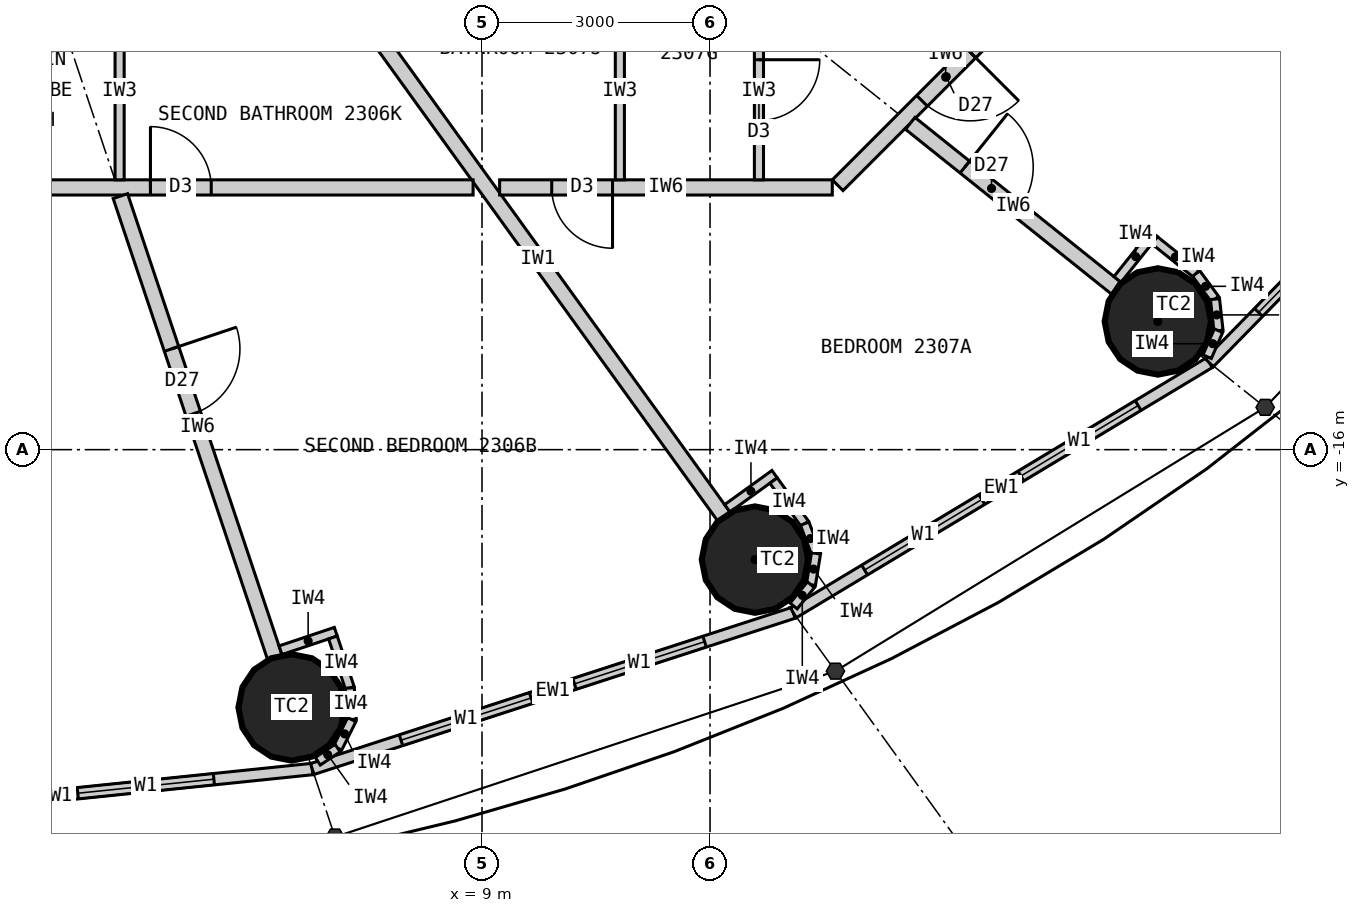
"""IFC4 building model, lengths in metres.
Left out: names, types, materials, properties, quantities, classifications, styles, units other than length and angle.
Written with IfcOpenShell. Run it as: python <this file> out.ifc"""

import sys

from ifc_helpers import new_model, si_unit, direction, frame, frame_2d, origin, origin_2d, place, context, subcontext, project, spatial, rectangle, circle, extrude, clip, halfspace, element, fill, save


model = new_model("IFC4")
c1 = context("Model", 3, precision=1e-05, world=origin(), true_north=direction((0.0, 1.0)))
c2 = subcontext(c1, "Body", "Model", "MODEL_VIEW")
j1 = project(units=[si_unit("LENGTHUNIT", "METRE"), si_unit("PLANEANGLEUNIT", "RADIAN")], contexts=[c1])
p1 = place(None, origin())
s1 = spatial("IfcSite", under=j1, at=p1, CompositionType="ELEMENT")
p2 = place(p1, origin())
s2 = spatial("IfcBuilding", under=s1, at=p2, CompositionType="ELEMENT")
p3 = place(p2, frame((0.0, 0.0, 90.3)))
s3 = spatial("IfcBuildingStorey", under=s2, at=p3, CompositionType="ELEMENT", Elevation=90.3)
for number, where, z_axis, x_axis in (
    (1, (6.495, -19.391, 0.0), (0.0, 0.0, 1.0), (1.0, 0.0, 0.0)),
    (2, (12.591, -17.447, 0.0), (0.0, 0.0, 1.0), (1.0, 0.0, 0.0)),
    (3, (17.892, -14.313, 0.0), (0.0, 0.0, 1.0), (1.0, 0.0, 0.0)),
):
    element("IfcColumn", number, at=place(p3, frame(where, z_axis=z_axis, x_axis=x_axis)), inside=s3, PredefinedType="COLUMN", context=c2, shape_type="Clipping", body=[
        clip(extrude(circle(Radius=0.7, at=origin_2d()), origin(), (0.0, 0.0, 1.0), 3.3), halfspace(frame((0.0, 0.0, 2.25), z_axis=(0.0, 0.0, 1.0), x_axis=(1.0, 0.0, 0.0)), False)),
    ])
p4 = place(p3, frame((0.0, -20.9, 0.0), z_axis=(0.0, 0.0, 1.0), x_axis=(0.994721394369, 0.102612609291, 0.0)))
e4 = element("IfcWall", 4, at=p4, inside=s3, PredefinedType="ELEMENTEDWALL", context=c2, shape_type="SweptSolid", body=[
    extrude(rectangle(XDim=6.802, YDim=0.15, at=frame_2d((3.401, 0.0))), origin(), (0.0, 0.0, 1.0), 3.05),
])
p5 = place(p4, frame((1.301, 0.0, 0.9)))
e5 = element("IfcOpeningElement", 5, at=p5, cuts=e4, PredefinedType="OPENING", context=c2, shape_type="SweptSolid", body=[
    extrude(rectangle(XDim=1.8, YDim=1.9, at=frame_2d((0.9, 0.95))), frame((0.0, 0.085, 0.0), z_axis=(0.0, -1.0, 0.0), x_axis=(1.0, 0.0, 0.0)), (0.0, 0.0, 1.0), 0.17),
])
p6 = place(p4, frame((3.701, 0.0, 0.9)))
e6 = element("IfcOpeningElement", 6, at=p6, cuts=e4, PredefinedType="OPENING", context=c2, shape_type="SweptSolid", body=[
    extrude(rectangle(XDim=1.8, YDim=1.9, at=frame_2d((0.9, 0.95))), frame((0.0, 0.085, 0.0), z_axis=(0.0, -1.0, 0.0), x_axis=(1.0, 0.0, 0.0)), (0.0, 0.0, 1.0), 0.17),
])
p7 = place(p3, frame((6.766, -20.202, 0.0), z_axis=(0.0, 0.0, 1.0), x_axis=(0.951137534625, 0.308767534285, 0.0)))
e7 = element("IfcWall", 7, at=p7, inside=s3, PredefinedType="ELEMENTEDWALL", context=c2, shape_type="SweptSolid", body=[
    extrude(rectangle(XDim=6.655, YDim=0.15, at=frame_2d((3.328, 0.0))), origin(), (0.0, 0.0, 1.0), 3.05),
])
p8 = place(p7, frame((1.228, 0.0, 0.9)))
e8 = element("IfcOpeningElement", 8, at=p8, cuts=e7, PredefinedType="OPENING", context=c2, shape_type="SweptSolid", body=[
    extrude(rectangle(XDim=1.8, YDim=1.9, at=frame_2d((0.9, 0.95))), frame((0.0, 0.085, 0.0), z_axis=(0.0, -1.0, 0.0), x_axis=(1.0, 0.0, 0.0)), (0.0, 0.0, 1.0), 0.17),
])
p9 = place(p7, frame((3.628, 0.0, 0.9)))
e9 = element("IfcOpeningElement", 9, at=p9, cuts=e7, PredefinedType="OPENING", context=c2, shape_type="SweptSolid", body=[
    extrude(rectangle(XDim=1.8, YDim=1.9, at=frame_2d((0.9, 0.95))), frame((0.0, 0.085, 0.0), z_axis=(0.0, -1.0, 0.0), x_axis=(1.0, 0.0, 0.0)), (0.0, 0.0, 1.0), 0.17),
])
p10 = place(p3, frame((13.096, -18.147, 0.0), z_axis=(0.0, 0.0, 1.0), x_axis=(0.856983180864, 0.515344377787, 0.0)))
e10 = element("IfcWall", 10, at=p10, inside=s3, PredefinedType="ELEMENTEDWALL", context=c2, shape_type="SweptSolid", body=[
    extrude(rectangle(XDim=6.386, YDim=0.15, at=frame_2d((3.193, 0.0))), origin(), (0.0, 0.0, 1.0), 3.05),
])
p11 = place(p10, frame((1.093, 0.0, 0.9)))
e11 = element("IfcOpeningElement", 11, at=p11, cuts=e10, PredefinedType="OPENING", context=c2, shape_type="SweptSolid", body=[
    extrude(rectangle(XDim=1.8, YDim=1.9, at=frame_2d((0.9, 0.95))), frame((0.0, 0.085, 0.0), z_axis=(0.0, -1.0, 0.0), x_axis=(1.0, 0.0, 0.0)), (0.0, 0.0, 1.0), 0.17),
])
p12 = place(p10, frame((3.493, 0.0, 0.9)))
e12 = element("IfcOpeningElement", 12, at=p12, cuts=e10, PredefinedType="OPENING", context=c2, shape_type="SweptSolid", body=[
    extrude(rectangle(XDim=1.8, YDim=1.9, at=frame_2d((0.9, 0.95))), frame((0.0, 0.085, 0.0), z_axis=(0.0, -1.0, 0.0), x_axis=(1.0, 0.0, 0.0)), (0.0, 0.0, 1.0), 0.17),
])
p13 = place(p3, frame((18.57, -14.856, 0.0), z_axis=(0.0, 0.0, 1.0), x_axis=(0.699602905915, 0.714531856557, 0.0)))
e13 = element("IfcWall", 13, at=p13, inside=s3, PredefinedType="ELEMENTEDWALL", context=c2, shape_type="SweptSolid", body=[
    extrude(rectangle(XDim=6.051, YDim=0.15, at=frame_2d((3.025, 0.0))), origin(), (0.0, 0.0, 1.0), 3.05),
])
p14 = place(p13, frame((0.926, 0.0, 0.9)))
e14 = element("IfcOpeningElement", 14, at=p14, cuts=e13, PredefinedType="OPENING", context=c2, shape_type="SweptSolid", body=[
    extrude(rectangle(XDim=1.8, YDim=1.9, at=frame_2d((0.9, 0.95))), frame((0.0, 0.085, 0.0), z_axis=(0.0, -1.0, 0.0), x_axis=(1.0, 0.0, 0.0)), (0.0, 0.0, 1.0), 0.17),
])
p15 = place(p13, frame((3.325, 0.0, 0.9)))
e15 = element("IfcOpeningElement", 15, at=p15, cuts=e13, PredefinedType="OPENING", context=c2, shape_type="SweptSolid", body=[
    extrude(rectangle(XDim=1.8, YDim=1.9, at=frame_2d((0.9, 0.95))), frame((0.0, 0.085, 0.0), z_axis=(0.0, -1.0, 0.0), x_axis=(1.0, 0.0, 0.0)), (0.0, 0.0, 1.0), 0.17),
])
p16 = place(p3, frame((7.289, -10.1, 0.0), z_axis=(0.0, 0.0, 1.0), x_axis=(0.585198353053, -0.810890182197, 0.0)))
e16 = element("IfcWall", 16, at=p16, inside=s3, PredefinedType="PARTITIONING", context=c2, shape_type="SweptSolid", body=[
    extrude(rectangle(XDim=8.36, YDim=0.2, at=frame_2d((4.18, 0.0))), origin(), (0.0, 0.0, 1.0), 2.15),
])
p17 = place(p3, frame((-8.883, -12.55, 0.0), z_axis=(0.0, 0.0, 1.0), x_axis=(1.0, 0.0, 0.0)))
e17 = element("IfcWall", 17, at=p17, inside=s3, PredefinedType="PARTITIONING", context=c2, shape_type="SweptSolid", body=[
    extrude(rectangle(XDim=17.765, YDim=0.2, at=frame_2d((8.883, 0.0))), origin(), (0.0, 0.0, 1.0), 3.05),
])
p18 = place(p17, frame((3.42, 0.0, 0.0)))
e18 = element("IfcOpeningElement", 18, at=p18, cuts=e17, PredefinedType="OPENING", context=c2, shape_type="SweptSolid", body=[
    extrude(rectangle(XDim=0.8, YDim=2.1, at=frame_2d((0.4, 1.05))), frame((0.0, 0.11, 0.0), z_axis=(0.0, -1.0, 0.0), x_axis=(1.0, 0.0, 0.0)), (0.0, 0.0, 1.0), 0.22),
])
p19 = place(p17, frame((13.52, 0.0, 0.0)))
e19 = element("IfcOpeningElement", 19, at=p19, cuts=e17, PredefinedType="OPENING", context=c2, shape_type="SweptSolid", body=[
    extrude(rectangle(XDim=0.8, YDim=2.1, at=frame_2d((0.4, 1.05))), frame((0.0, 0.11, 0.0), z_axis=(0.0, -1.0, 0.0), x_axis=(1.0, 0.0, 0.0)), (0.0, 0.0, 1.0), 0.22),
])
p20 = place(p17, frame((8.42, 0.0, 0.0)))
e20 = element("IfcOpeningElement", 20, at=p20, cuts=e17, PredefinedType="OPENING", context=c2, shape_type="SweptSolid", body=[
    extrude(rectangle(XDim=0.9, YDim=2.1, at=frame_2d((0.45, 1.05))), frame((0.0, 0.11, 0.0), z_axis=(0.0, -1.0, 0.0), x_axis=(1.0, 0.0, 0.0)), (0.0, 0.0, 1.0), 0.22),
])
p21 = place(p3, frame((4.242, -12.664, 0.0), z_axis=(0.0, 0.0, 1.0), x_axis=(0.317590505374, -0.94822796357, 0.0)))
e21 = element("IfcWall", 21, at=p21, inside=s3, PredefinedType="PARTITIONING", context=c2, shape_type="SweptSolid", body=[
    extrude(rectangle(XDim=6.394, YDim=0.2, at=frame_2d((3.197, 0.0))), origin(), (0.0, 0.0, 1.0), 2.15),
])
p22 = place(p21, frame((2.12, 0.0, 0.0)))
e22 = element("IfcOpeningElement", 22, at=p22, cuts=e21, PredefinedType="OPENING", context=c2, shape_type="SweptSolid", body=[
    extrude(rectangle(XDim=0.9, YDim=2.1, at=frame_2d((0.45, 1.05))), frame((0.0, 0.11, 0.0), z_axis=(0.0, -1.0, 0.0), x_axis=(1.0, 0.0, 0.0)), (0.0, 0.0, 1.0), 0.22),
])
p23 = place(p3, frame((4.232, -10.1, 0.0), z_axis=(0.0, 0.0, 1.0), x_axis=(0.0, -1.0, 0.0)))
e23 = element("IfcWall", 23, at=p23, inside=s3, PredefinedType="PARTITIONING", context=c2, shape_type="SweptSolid", body=[
    extrude(rectangle(XDim=2.35, YDim=0.12, at=frame_2d((1.175, 0.0))), origin(), (0.0, 0.0, 1.0), 3.05),
])
p24 = place(p3, frame((9.232, -12.55, 0.0), z_axis=(0.0, 0.0, 1.0), x_axis=(1.0, 0.0, 0.0)))
e24 = element("IfcWall", 24, at=p24, inside=s3, PredefinedType="PARTITIONING", context=c2, shape_type="SweptSolid", body=[
    extrude(rectangle(XDim=4.377, YDim=0.2, at=frame_2d((2.188, 0.0))), origin(), (0.0, 0.0, 1.0), 3.05),
])
p25 = place(p24, frame((0.685, 0.0, 0.0)))
e25 = element("IfcOpeningElement", 25, at=p25, cuts=e24, PredefinedType="OPENING", context=c2, shape_type="SweptSolid", body=[
    extrude(rectangle(XDim=0.8, YDim=2.1, at=frame_2d((0.4, 1.05))), frame((0.0, 0.11, 0.0), z_axis=(0.0, -1.0, 0.0), x_axis=(1.0, 0.0, 0.0)), (0.0, 0.0, 1.0), 0.22),
])
p26 = place(p3, frame((13.679, -12.521, 0.0), z_axis=(0.0, 0.0, 1.0), x_axis=(0.707106781187, 0.707106781187, 0.0)))
e26 = element("IfcWall", 26, at=p26, inside=s3, PredefinedType="PARTITIONING", context=c2, shape_type="SweptSolid", body=[
    extrude(rectangle(XDim=4.019, YDim=0.2, at=frame_2d((2.009, 0.0))), origin(), (0.0, 0.0, 1.0), 3.05),
])
p27 = place(p26, frame((1.57, 0.0, 0.0)))
e27 = element("IfcOpeningElement", 27, at=p27, cuts=e26, PredefinedType="OPENING", context=c2, shape_type="SweptSolid", body=[
    extrude(rectangle(XDim=0.9, YDim=2.1, at=frame_2d((0.45, 1.05))), frame((0.0, 0.11, 0.0), z_axis=(0.0, -1.0, 0.0), x_axis=(1.0, 0.0, 0.0)), (0.0, 0.0, 1.0), 0.22),
])
p28 = place(p3, frame((14.634, -11.707, 0.0), z_axis=(0.0, 0.0, 1.0), x_axis=(0.780903110683, -0.624652168591, 0.0)))
e28 = element("IfcWall", 28, at=p28, inside=s3, PredefinedType="PARTITIONING", context=c2, shape_type="SweptSolid", body=[
    extrude(rectangle(XDim=3.472, YDim=0.2, at=frame_2d((1.736, 0.0))), origin(), (0.0, 0.0, 1.0), 2.25),
])
p29 = place(p28, frame((0.92, 0.0, 0.0)))
e29 = element("IfcOpeningElement", 29, at=p29, cuts=e28, PredefinedType="OPENING", context=c2, shape_type="SweptSolid", body=[
    extrude(rectangle(XDim=0.9, YDim=2.1, at=frame_2d((0.45, 1.05))), frame((0.0, 0.11, 0.0), z_axis=(0.0, -1.0, 0.0), x_axis=(1.0, 0.0, 0.0)), (0.0, 0.0, 1.0), 0.22),
])
p30 = place(p3, frame((10.814, -10.1, 0.0), z_axis=(0.0, 0.0, 1.0), x_axis=(0.0, -1.0, 0.0)))
e30 = element("IfcWall", 30, at=p30, inside=s3, PredefinedType="PARTITIONING", context=c2, shape_type="SweptSolid", body=[
    extrude(rectangle(XDim=2.35, YDim=0.12, at=frame_2d((1.175, 0.0))), origin(), (0.0, 0.0, 1.0), 3.05),
])
p31 = place(p3, frame((12.644, -10.1, 0.0), z_axis=(0.0, 0.0, 1.0), x_axis=(0.0, -1.0, 0.0)))
e31 = element("IfcWall", 31, at=p31, inside=s3, PredefinedType="PARTITIONING", context=c2, shape_type="SweptSolid", body=[
    extrude(rectangle(XDim=2.35, YDim=0.12, at=frame_2d((1.175, 0.0))), origin(), (0.0, 0.0, 1.0), 3.05),
])
p32 = place(p31, frame((0.77, 0.0, 0.0)))
e32 = element("IfcOpeningElement", 32, at=p32, cuts=e31, PredefinedType="OPENING", context=c2, shape_type="SweptSolid", body=[
    extrude(rectangle(XDim=0.8, YDim=2.1, at=frame_2d((0.4, 1.05))), frame((0.0, 0.07, 0.0), z_axis=(0.0, -1.0, 0.0), x_axis=(1.0, 0.0, 0.0)), (0.0, 0.0, 1.0), 0.14),
])
p33 = place(p3, frame((6.348, -18.639, 0.0), z_axis=(0.0, 0.0, 1.0), x_axis=(0.948268951266, 0.317468102437, 0.0)))
e33 = element("IfcWall", 33, at=p33, inside=s3, PredefinedType="PARTITIONING", context=c2, shape_type="SweptSolid", body=[
    extrude(rectangle(XDim=0.768, YDim=0.12, at=frame_2d((0.384, 0.0))), origin(), (0.0, 0.0, 1.0), 3.05),
])
p34 = place(p3, frame((7.038, -18.471, 0.0), z_axis=(0.0, 0.0, 1.0), x_axis=(0.317378466199, -0.9482989556, 0.0)))
e34 = element("IfcWall", 34, at=p34, inside=s3, PredefinedType="PARTITIONING", context=c2, shape_type="SweptSolid", body=[
    extrude(rectangle(XDim=0.7, YDim=0.12, at=frame_2d((0.35, 0.0))), origin(), (0.0, 0.0, 1.0), 3.05),
])
p35 = place(p3, frame((7.26, -19.135, 0.0), z_axis=(0.0, 0.0, 1.0), x_axis=(0.0613238046, -0.99811792439, 0.0)))
e35 = element("IfcWall", 35, at=p35, inside=s3, PredefinedType="PARTITIONING", context=c2, shape_type="SweptSolid", body=[
    extrude(rectangle(XDim=0.418, YDim=0.12, at=frame_2d((0.209, 0.0))), origin(), (0.0, 0.0, 1.0), 3.05),
])
p36 = place(p3, frame((7.286, -19.552, 0.0), z_axis=(0.0, 0.0, 1.0), x_axis=(-0.445810757773, -0.89512723579, 0.0)))
e36 = element("IfcWall", 36, at=p36, inside=s3, PredefinedType="PARTITIONING", context=c2, shape_type="SweptSolid", body=[
    extrude(rectangle(XDim=0.418, YDim=0.12, at=frame_2d((0.209, 0.0))), origin(), (0.0, 0.0, 1.0), 3.05),
])
p37 = place(p3, frame((7.1, -19.926, 0.0), z_axis=(0.0, 0.0, 1.0), x_axis=(-0.833488262509, -0.552537162787, 0.0)))
e37 = element("IfcWall", 37, at=p37, inside=s3, PredefinedType="PARTITIONING", context=c2, shape_type="SweptSolid", body=[
    extrude(rectangle(XDim=0.313, YDim=0.12, at=frame_2d((0.156, 0.0))), origin(), (0.0, 0.0, 1.0), 3.05),
])
p38 = place(p3, frame((12.227, -16.772, 0.0), z_axis=(0.0, 0.0, 1.0), x_axis=(0.810821798253, 0.585293098778, 0.0)))
e38 = element("IfcWall", 38, at=p38, inside=s3, PredefinedType="PARTITIONING", context=c2, shape_type="SweptSolid", body=[
    extrude(rectangle(XDim=0.768, YDim=0.12, at=frame_2d((0.384, 0.0))), origin(), (0.0, 0.0, 1.0), 3.05),
])
p39 = place(p3, frame((12.836, -16.406, 0.0), z_axis=(0.0, 0.0, 1.0), x_axis=(0.585223113993, -0.810872312296, 0.0)))
e39 = element("IfcWall", 39, at=p39, inside=s3, PredefinedType="PARTITIONING", context=c2, shape_type="SweptSolid", body=[
    extrude(rectangle(XDim=0.7, YDim=0.12, at=frame_2d((0.35, 0.0))), origin(), (0.0, 0.0, 1.0), 3.05),
])
p40 = place(p3, frame((13.246, -16.974, 0.0), z_axis=(0.0, 0.0, 1.0), x_axis=(0.355728122235, -0.934589483705, 0.0)))
e40 = element("IfcWall", 40, at=p40, inside=s3, PredefinedType="PARTITIONING", context=c2, shape_type="SweptSolid", body=[
    extrude(rectangle(XDim=0.418, YDim=0.12, at=frame_2d((0.209, 0.0))), origin(), (0.0, 0.0, 1.0), 3.05),
])
p41 = place(p3, frame((13.394, -17.365, 0.0), z_axis=(0.0, 0.0, 1.0), x_axis=(-0.159379276926, -0.987217425943, 0.0)))
e41 = element("IfcWall", 41, at=p41, inside=s3, PredefinedType="PARTITIONING", context=c2, shape_type="SweptSolid", body=[
    extrude(rectangle(XDim=0.418, YDim=0.12, at=frame_2d((0.209, 0.0))), origin(), (0.0, 0.0, 1.0), 3.05),
])
p42 = place(p3, frame((13.328, -17.777, 0.0), z_axis=(0.0, 0.0, 1.0), x_axis=(-0.632276783541, -0.774742582407, 0.0)))
e42 = element("IfcWall", 42, at=p42, inside=s3, PredefinedType="PARTITIONING", context=c2, shape_type="SweptSolid", body=[
    extrude(rectangle(XDim=0.36, YDim=0.12, at=frame_2d((0.18, 0.0))), origin(), (0.0, 0.0, 1.0), 3.05),
])
p43 = place(p3, frame((17.361, -13.76, 0.0), z_axis=(0.0, 0.0, 1.0), x_axis=(0.624501042889, 0.781023973659, 0.0)))
e43 = element("IfcWall", 43, at=p43, inside=s3, PredefinedType="PARTITIONING", context=c2, shape_type="SweptSolid", body=[
    extrude(rectangle(XDim=0.767, YDim=0.12, at=frame_2d((0.384, 0.0))), origin(), (0.0, 0.0, 1.0), 3.05),
])
p44 = place(p3, frame((17.85, -13.246, 0.0), z_axis=(0.0, 0.0, 1.0), x_axis=(0.780902834923, -0.62465251333, 0.0)))
e44 = element("IfcWall", 44, at=p44, inside=s3, PredefinedType="PARTITIONING", context=c2, shape_type="SweptSolid", body=[
    extrude(rectangle(XDim=0.7, YDim=0.12, at=frame_2d((0.35, 0.0))), origin(), (0.0, 0.0, 1.0), 3.05),
])
for number, where, z_axis, x_axis in (
    (45, (18.396, -13.683, 0.0), (0.0, 0.0, 1.0), (0.592, -0.806, 0.0)),
    (46, (18.644, -14.02, 0.0), (0.0, 0.0, 1.0), (0.11, -0.994, 0.0)),
):
    element("IfcWall", number, at=place(p3, frame(where, z_axis=z_axis, x_axis=x_axis)), inside=s3, PredefinedType="PARTITIONING", context=c2, shape_type="SweptSolid", body=[
        extrude(rectangle(XDim=0.418, YDim=0.12, at=frame_2d((0.209, 0.0))), origin(), (0.0, 0.0, 1.0), 3.05),
    ])
p45 = place(p3, frame((18.69, -14.435, 0.0), z_axis=(0.0, 0.0, 1.0), x_axis=(-0.401093412634, -0.91603715773, 0.0)))
e47 = element("IfcWall", 47, at=p45, inside=s3, PredefinedType="PARTITIONING", context=c2, shape_type="SweptSolid", body=[
    extrude(rectangle(XDim=0.373, YDim=0.12, at=frame_2d((0.187, 0.0))), origin(), (0.0, 0.0, 1.0), 3.05),
])
p46 = place(p6, origin())
e48 = element("IfcWindow", 48, at=p46, inside=s3, PartitioningType="SINGLE_PANEL", PredefinedType="WINDOW", context=c2, shape_type="SweptSolid", body=[
    extrude(rectangle(XDim=1.8, YDim=1.9, at=frame_2d((0.9, 0.95))), frame((0.0, 0.03, 0.0), z_axis=(0.0, -1.0, 0.0), x_axis=(1.0, 0.0, 0.0)), (0.0, 0.0, 1.0), 0.06),
])
fill(e6, e48)
p47 = place(p8, origin())
e49 = element("IfcWindow", 49, at=p47, inside=s3, PartitioningType="SINGLE_PANEL", PredefinedType="WINDOW", context=c2, shape_type="SweptSolid", body=[
    extrude(rectangle(XDim=1.8, YDim=1.9, at=frame_2d((0.9, 0.95))), frame((0.0, 0.03, 0.0), z_axis=(0.0, -1.0, 0.0), x_axis=(1.0, 0.0, 0.0)), (0.0, 0.0, 1.0), 0.06),
])
fill(e8, e49)
p48 = place(p9, origin())
e50 = element("IfcWindow", 50, at=p48, inside=s3, PartitioningType="SINGLE_PANEL", PredefinedType="WINDOW", context=c2, shape_type="SweptSolid", body=[
    extrude(rectangle(XDim=1.8, YDim=1.9, at=frame_2d((0.9, 0.95))), frame((0.0, 0.03, 0.0), z_axis=(0.0, -1.0, 0.0), x_axis=(1.0, 0.0, 0.0)), (0.0, 0.0, 1.0), 0.06),
])
fill(e9, e50)
p49 = place(p11, origin())
e51 = element("IfcWindow", 51, at=p49, inside=s3, PartitioningType="SINGLE_PANEL", PredefinedType="WINDOW", context=c2, shape_type="SweptSolid", body=[
    extrude(rectangle(XDim=1.8, YDim=1.9, at=frame_2d((0.9, 0.95))), frame((0.0, 0.03, 0.0), z_axis=(0.0, -1.0, 0.0), x_axis=(1.0, 0.0, 0.0)), (0.0, 0.0, 1.0), 0.06),
])
fill(e11, e51)
p50 = place(p12, origin())
e52 = element("IfcWindow", 52, at=p50, inside=s3, PartitioningType="SINGLE_PANEL", PredefinedType="WINDOW", context=c2, shape_type="SweptSolid", body=[
    extrude(rectangle(XDim=1.8, YDim=1.9, at=frame_2d((0.9, 0.95))), frame((0.0, 0.03, 0.0), z_axis=(0.0, -1.0, 0.0), x_axis=(1.0, 0.0, 0.0)), (0.0, 0.0, 1.0), 0.06),
])
fill(e12, e52)
p51 = place(p14, origin())
e53 = element("IfcWindow", 53, at=p51, inside=s3, PartitioningType="SINGLE_PANEL", PredefinedType="WINDOW", context=c2, shape_type="SweptSolid", body=[
    extrude(rectangle(XDim=1.8, YDim=1.9, at=frame_2d((0.9, 0.95))), frame((0.0, 0.03, 0.0), z_axis=(0.0, -1.0, 0.0), x_axis=(1.0, 0.0, 0.0)), (0.0, 0.0, 1.0), 0.06),
])
fill(e14, e53)
p52 = place(p19, origin())
e54 = element("IfcDoor", 54, at=p52, inside=s3, OperationType="SINGLE_SWING_LEFT", PredefinedType="DOOR", context=c2, shape_type="SweptSolid", body=[
    extrude(rectangle(XDim=0.8, YDim=2.1, at=frame_2d((0.4, 1.05))), frame((0.0, 0.025, 0.0), z_axis=(0.0, -1.0, 0.0), x_axis=(1.0, 0.0, 0.0)), (0.0, 0.0, 1.0), 0.05),
])
fill(e19, e54)
p53 = place(p22, origin())
e55 = element("IfcDoor", 55, at=p53, inside=s3, OperationType="SINGLE_SWING_LEFT", PredefinedType="DOOR", context=c2, shape_type="SweptSolid", body=[
    extrude(rectangle(XDim=0.9, YDim=2.1, at=frame_2d((0.45, 1.05))), frame((0.0, 0.025, 0.0), z_axis=(0.0, -1.0, 0.0), x_axis=(1.0, 0.0, 0.0)), (0.0, 0.0, 1.0), 0.05),
])
fill(e22, e55)
p54 = place(p25, origin())
e56 = element("IfcDoor", 56, at=p54, inside=s3, OperationType="SINGLE_SWING_RIGHT", PredefinedType="DOOR", context=c2, shape_type="SweptSolid", body=[
    extrude(rectangle(XDim=0.8, YDim=2.1, at=frame_2d((0.4, 1.05))), frame((0.0, 0.025, 0.0), z_axis=(0.0, -1.0, 0.0), x_axis=(1.0, 0.0, 0.0)), (0.0, 0.0, 1.0), 0.05),
])
fill(e25, e56)
p55 = place(p32, origin())
e57 = element("IfcDoor", 57, at=p55, inside=s3, OperationType="SINGLE_SWING_LEFT", PredefinedType="DOOR", context=c2, shape_type="SweptSolid", body=[
    extrude(rectangle(XDim=0.8, YDim=2.1, at=frame_2d((0.4, 1.05))), frame((0.0, 0.025, 0.0), z_axis=(0.0, -1.0, 0.0), x_axis=(1.0, 0.0, 0.0)), (0.0, 0.0, 1.0), 0.05),
])
fill(e32, e57)
p56 = place(p27, origin())
e58 = element("IfcDoor", 58, at=p56, inside=s3, OperationType="SINGLE_SWING_RIGHT", PredefinedType="DOOR", context=c2, shape_type="SweptSolid", body=[
    extrude(rectangle(XDim=0.9, YDim=2.1, at=frame_2d((0.45, 1.05))), frame((0.0, 0.025, 0.0), z_axis=(0.0, -1.0, 0.0), x_axis=(1.0, 0.0, 0.0)), (0.0, 0.0, 1.0), 0.05),
])
fill(e27, e58)
p57 = place(p29, origin())
e59 = element("IfcDoor", 59, at=p57, inside=s3, OperationType="SINGLE_SWING_LEFT", PredefinedType="DOOR", context=c2, shape_type="SweptSolid", body=[
    extrude(rectangle(XDim=0.9, YDim=2.1, at=frame_2d((0.45, 1.05))), frame((0.0, 0.025, 0.0), z_axis=(0.0, -1.0, 0.0), x_axis=(1.0, 0.0, 0.0)), (0.0, 0.0, 1.0), 0.05),
])
fill(e29, e59)
save(model, sys.argv[1])
